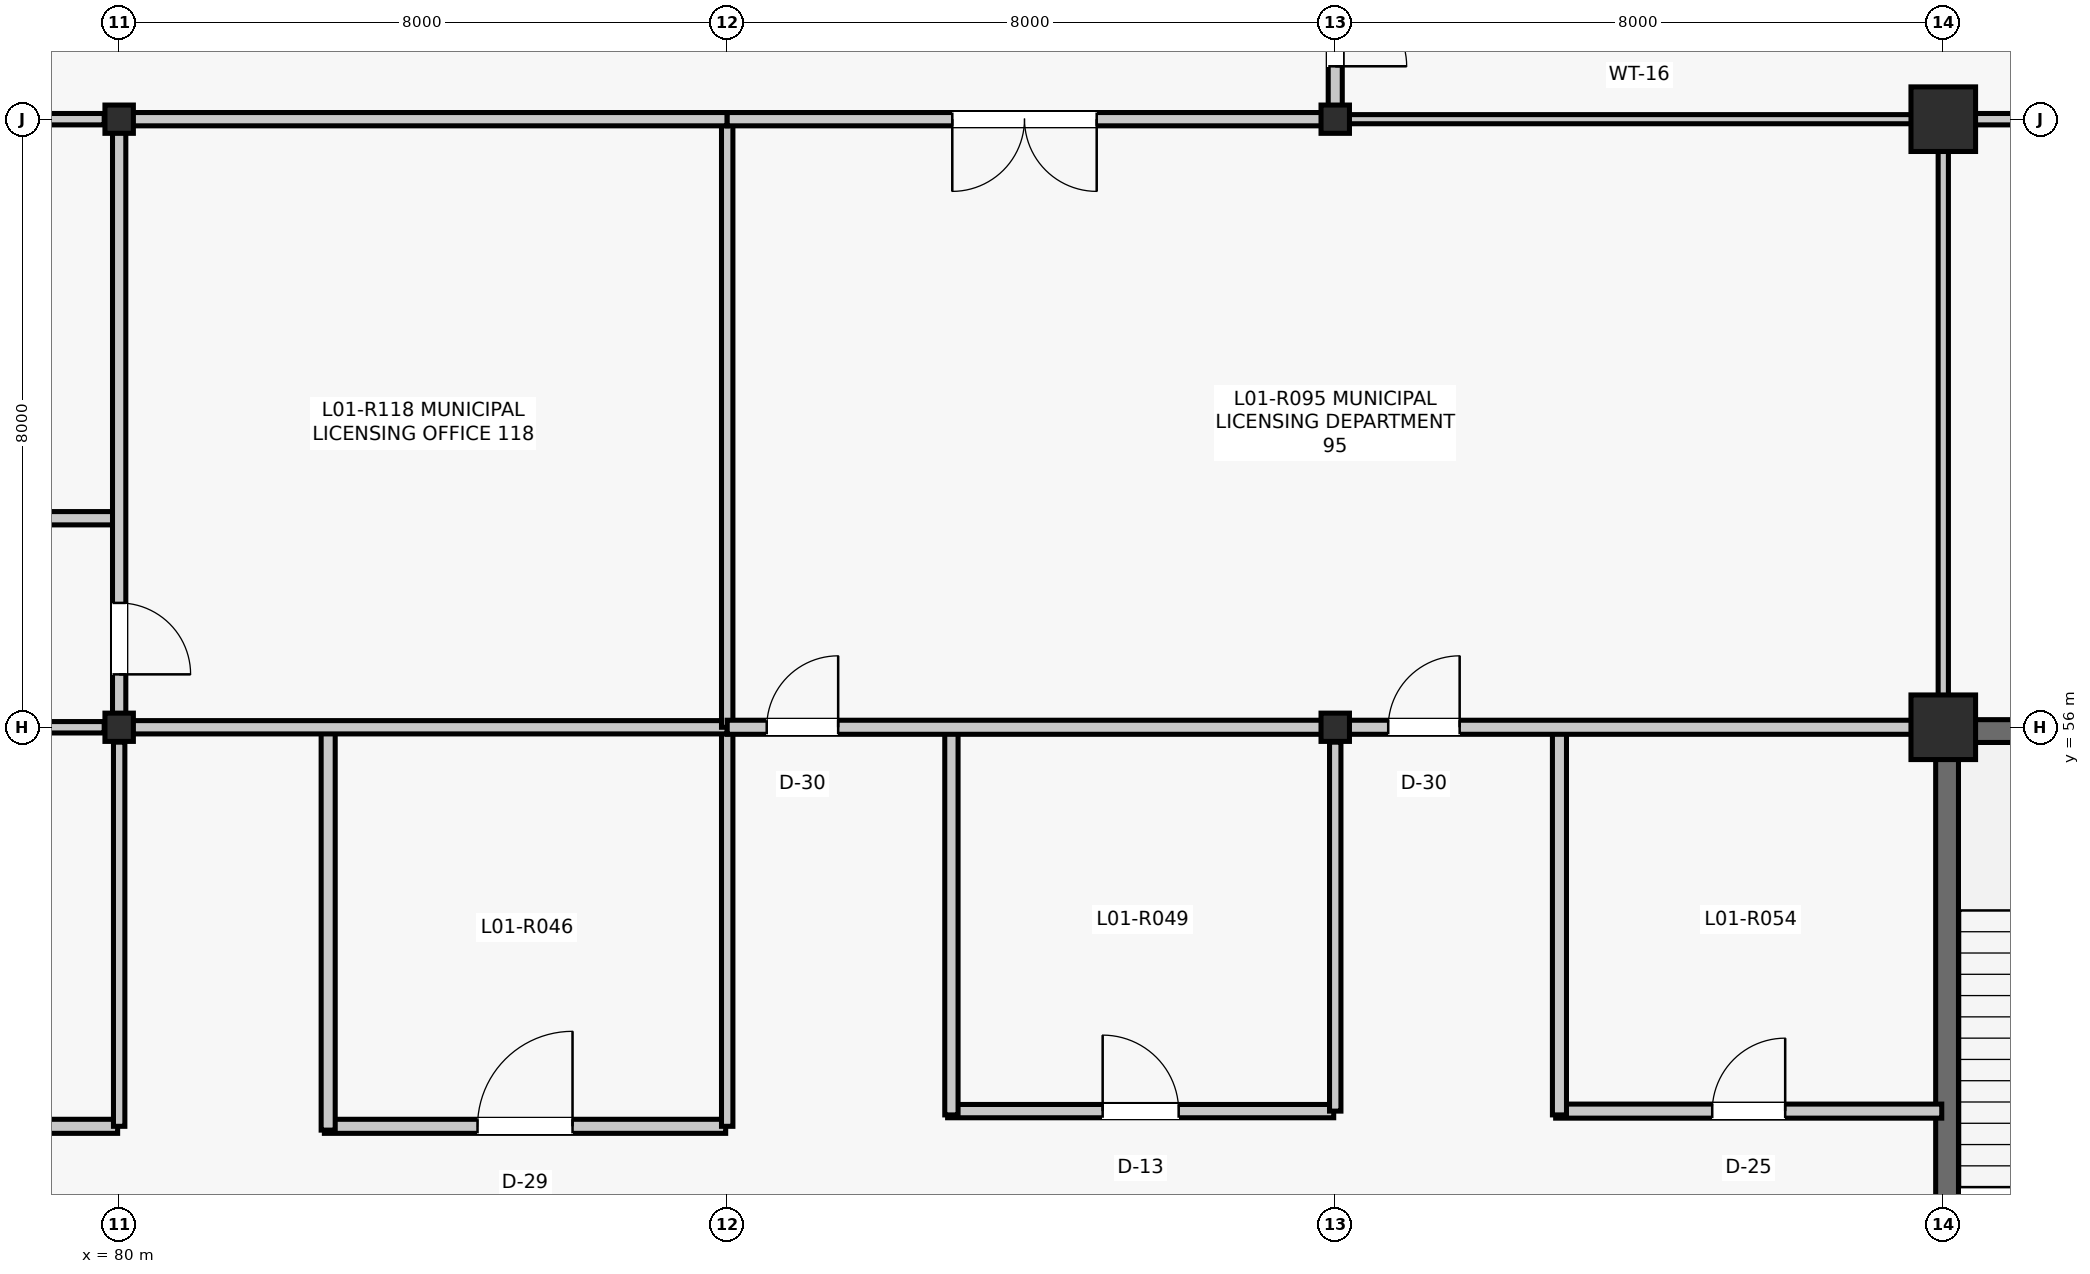
"""IFC4 building model, lengths in metres.
Left out: names, types, materials, properties, quantities, classifications, styles, units other than length and angle.
Written with IfcOpenShell. Run it as: python <this file> out.ifc"""

import sys

from ifc_helpers import new_model, si_unit, direction, frame, frame_2d, origin, origin_2d, place, context, subcontext, project, spatial, rectangle, i_section, extrude, element, fill, save


model = new_model("IFC4")
c1 = context("Model", 3, precision=1e-05, world=origin(), true_north=direction((0.0, 1.0)))
c2 = subcontext(c1, "Body", "Model", "MODEL_VIEW")
j1 = project(units=[si_unit("LENGTHUNIT", "METRE"), si_unit("PLANEANGLEUNIT", "RADIAN")], contexts=[c1])
p1 = place(None, origin())
s1 = spatial("IfcSite", under=j1, at=p1, CompositionType="ELEMENT")
p2 = place(p1, origin())
s2 = spatial("IfcBuilding", under=s1, at=p2, CompositionType="ELEMENT")
p3 = place(p2, frame((0.0, 0.0, 5.28)))
s3 = spatial("IfcBuildingStorey", under=s2, at=p3, CompositionType="ELEMENT", Elevation=5.28)
for number, where, z_axis, x_axis in (
    (1, (80.0, 56.0, 0.0), (0.0, 0.0, 1.0), (1.0, 0.0, 0.0)),
    (2, (80.0, 64.0, 0.0), (0.0, 0.0, 1.0), (1.0, 0.0, 0.0)),
    (3, (96.0, 56.0, 0.0), (0.0, 0.0, 1.0), (1.0, 0.0, 0.0)),
    (4, (96.0, 64.0, 0.0), (0.0, 0.0, 1.0), (1.0, 0.0, 0.0)),
):
    element("IfcColumn", number, at=place(p3, frame(where, z_axis=z_axis, x_axis=x_axis)), inside=s3, PredefinedType="COLUMN", context=c2, shape_type="SweptSolid", body=[
        extrude(i_section(OverallWidth=0.374, OverallDepth=0.372, WebThickness=0.016, FlangeThickness=0.026, FilletRadius=0.015, at=origin_2d()), origin(), (0.0, 0.0, 1.0), 4.62),
    ])
for number, where, z_axis, x_axis in (
    (5, (104.0, 56.0, 0.0), (0.0, 0.0, 1.0), (1.0, 0.0, 0.0)),
    (6, (104.0, 64.0, 0.0), (0.0, 0.0, 1.0), (1.0, 0.0, 0.0)),
):
    element("IfcColumn", number, at=place(p3, frame(where, z_axis=z_axis, x_axis=x_axis)), inside=s3, PredefinedType="COLUMN", context=c2, shape_type="SweptSolid", body=[
        extrude(rectangle(XDim=0.85, YDim=0.85, at=origin_2d()), origin(), (0.0, 0.0, 1.0), 4.62),
    ])
p4 = place(p3, frame((104.05, 48.315, 0.0), z_axis=(0.0, 0.0, 1.0), x_axis=(0.0, 1.0, 0.0)))
e7 = element("IfcWall", 7, at=p4, inside=s3, PredefinedType="SHEAR", context=c2, shape_type="SweptSolid", body=[
    extrude(rectangle(XDim=7.37, YDim=0.3, at=frame_2d((3.685, 0.0))), origin(), (0.0, 0.0, 1.0), 4.335),
])
p5 = place(p3, frame((104.315, 55.95, 0.0), z_axis=(0.0, 0.0, 1.0), x_axis=(1.0, 0.0, 0.0)))
e8 = element("IfcWall", 8, at=p5, inside=s3, PredefinedType="SHEAR", context=c2, shape_type="SweptSolid", body=[
    extrude(rectangle(XDim=7.395, YDim=0.3, at=frame_2d((3.698, 0.0))), origin(), (0.0, 0.0, 1.0), 4.335),
])
p6 = place(p3, frame((74.7, 50.75, 0.0), z_axis=(0.0, 0.0, 1.0), x_axis=(1.0, 0.0, 0.0)))
e9 = element("IfcWall", 9, at=p6, inside=s3, PredefinedType="PARTITIONING", context=c2, shape_type="SweptSolid", body=[
    extrude(rectangle(XDim=5.28, YDim=0.185, at=frame_2d((2.64, 0.0))), origin(), (0.0, 0.0, 1.0), 3.787),
])
p7 = place(p6, frame((2.1, 0.0, 0.0)))
e10 = element("IfcOpeningElement", 10, at=p7, cuts=e9, PredefinedType="OPENING", context=c2, shape_type="SweptSolid", body=[
    extrude(rectangle(XDim=1.08, YDim=2.2, at=frame_2d((0.54, 1.1))), frame((0.0, 0.103, 0.0), z_axis=(0.0, -1.0, 0.0), x_axis=(1.0, 0.0, 0.0)), (0.0, 0.0, 1.0), 0.205),
])
p8 = place(p3, frame((74.75, 56.0, 0.0), z_axis=(0.0, 0.0, 1.0), x_axis=(1.0, 0.0, 0.0)))
e11 = element("IfcWall", 11, at=p8, inside=s3, PredefinedType="PARTITIONING", context=c2, shape_type="SweptSolid", body=[
    extrude(rectangle(XDim=5.053, YDim=0.15, at=frame_2d((2.526, 0.0))), origin(), (0.0, 0.0, 1.0), 3.712),
])
p9 = place(p3, frame((80.0, 50.75, 0.0), z_axis=(0.0, 0.0, 1.0), x_axis=(0.0, 1.0, 0.0)))
e12 = element("IfcWall", 12, at=p9, inside=s3, PredefinedType="PARTITIONING", context=c2, shape_type="SweptSolid", body=[
    extrude(rectangle(XDim=5.054, YDim=0.15, at=frame_2d((2.527, 0.0))), origin(), (0.0, 0.0, 1.0), 3.787),
])
p10 = place(p3, frame((74.7, 58.75, 0.0), z_axis=(0.0, 0.0, 1.0), x_axis=(1.0, 0.0, 0.0)))
e13 = element("IfcWall", 13, at=p10, inside=s3, PredefinedType="PARTITIONING", context=c2, shape_type="SweptSolid", body=[
    extrude(rectangle(XDim=5.28, YDim=0.175, at=frame_2d((2.64, 0.0))), origin(), (0.0, 0.0, 1.0), 3.857),
])
p11 = place(p10, frame((2.12, 0.0, 0.0)))
e14 = element("IfcOpeningElement", 14, at=p11, cuts=e13, PredefinedType="OPENING", context=c2, shape_type="SweptSolid", body=[
    extrude(rectangle(XDim=1.04, YDim=2.18, at=frame_2d((0.52, 1.09))), frame((0.0, 0.097, 0.0), z_axis=(0.0, -1.0, 0.0), x_axis=(1.0, 0.0, 0.0)), (0.0, 0.0, 1.0), 0.195),
])
p12 = place(p3, frame((74.75, 64.0, 0.0), z_axis=(0.0, 0.0, 1.0), x_axis=(1.0, 0.0, 0.0)))
e15 = element("IfcWall", 15, at=p12, inside=s3, PredefinedType="PARTITIONING", context=c2, shape_type="SweptSolid", body=[
    extrude(rectangle(XDim=5.053, YDim=0.15, at=frame_2d((2.526, 0.0))), origin(), (0.0, 0.0, 1.0), 3.787),
])
p13 = place(p3, frame((82.7, 50.75, 0.0), z_axis=(0.0, 0.0, 1.0), x_axis=(1.0, 0.0, 0.0)))
e16 = element("IfcWall", 16, at=p13, inside=s3, PredefinedType="PARTITIONING", context=c2, shape_type="SweptSolid", body=[
    extrude(rectangle(XDim=5.28, YDim=0.185, at=frame_2d((2.64, 0.0))), origin(), (0.0, 0.0, 1.0), 4.325),
])
p14 = place(p13, frame((2.015, 0.0, 0.0)))
e17 = element("IfcOpeningElement", 17, at=p14, cuts=e16, PredefinedType="OPENING", context=c2, shape_type="SweptSolid", body=[
    extrude(rectangle(XDim=1.25, YDim=2.18, at=frame_2d((0.625, 1.09))), frame((0.0, 0.103, 0.0), z_axis=(0.0, -1.0, 0.0), x_axis=(1.0, 0.0, 0.0)), (0.0, 0.0, 1.0), 0.205),
])
p15 = place(p3, frame((82.75, 50.7, 0.0), z_axis=(0.0, 0.0, 1.0), x_axis=(0.0, 1.0, 0.0)))
e18 = element("IfcWall", 18, at=p15, inside=s3, PredefinedType="PARTITIONING", context=c2, shape_type="SweptSolid", body=[
    extrude(rectangle(XDim=5.28, YDim=0.185, at=frame_2d((2.64, 0.0))), origin(), (0.0, 0.0, 1.0), 3.55),
])
p16 = place(p3, frame((88.0, 50.75, 0.0), z_axis=(0.0, 0.0, 1.0), x_axis=(0.0, 1.0, 0.0)))
e19 = element("IfcWall", 19, at=p16, inside=s3, PredefinedType="PARTITIONING", context=c2, shape_type="SweptSolid", body=[
    extrude(rectangle(XDim=5.23, YDim=0.15, at=frame_2d((2.615, 0.0))), origin(), (0.0, 0.0, 1.0), 3.55),
])
p17 = place(p3, frame((90.9, 50.95, 0.0), z_axis=(0.0, 0.0, 1.0), x_axis=(1.0, 0.0, 0.0)))
e20 = element("IfcWall", 20, at=p17, inside=s3, PredefinedType="PARTITIONING", context=c2, shape_type="SweptSolid", body=[
    extrude(rectangle(XDim=5.08, YDim=0.175, at=frame_2d((2.54, 0.0))), origin(), (0.0, 0.0, 1.0), 3.781),
])
p18 = place(p17, frame((2.04, 0.0, 0.0)))
e21 = element("IfcOpeningElement", 21, at=p18, cuts=e20, PredefinedType="OPENING", context=c2, shape_type="SweptSolid", body=[
    extrude(rectangle(XDim=1.0, YDim=2.15, at=frame_2d((0.5, 1.075))), frame((0.0, 0.097, 0.0), z_axis=(0.0, -1.0, 0.0), x_axis=(1.0, 0.0, 0.0)), (0.0, 0.0, 1.0), 0.195),
])
p19 = place(p3, frame((90.95, 50.9, 0.0), z_axis=(0.0, 0.0, 1.0), x_axis=(0.0, 1.0, 0.0)))
e22 = element("IfcWall", 22, at=p19, inside=s3, PredefinedType="PARTITIONING", context=c2, shape_type="SweptSolid", body=[
    extrude(rectangle(XDim=5.08, YDim=0.175, at=frame_2d((2.54, 0.0))), origin(), (0.0, 0.0, 1.0), 3.55),
])
p20 = place(p3, frame((96.0, 50.95, 0.0), z_axis=(0.0, 0.0, 1.0), x_axis=(0.0, 1.0, 0.0)))
e23 = element("IfcWall", 23, at=p20, inside=s3, PredefinedType="PARTITIONING", context=c2, shape_type="SweptSolid", body=[
    extrude(rectangle(XDim=4.854, YDim=0.15, at=frame_2d((2.427, 0.0))), origin(), (0.0, 0.0, 1.0), 3.781),
])
p21 = place(p3, frame((98.9, 50.95, 0.0), z_axis=(0.0, 0.0, 1.0), x_axis=(1.0, 0.0, 0.0)))
e24 = element("IfcWall", 24, at=p21, inside=s3, PredefinedType="PARTITIONING", context=c2, shape_type="SweptSolid", body=[
    extrude(rectangle(XDim=5.08, YDim=0.185, at=frame_2d((2.54, 0.0))), origin(), (0.0, 0.0, 1.0), 3.851),
])
p22 = place(p21, frame((2.06, 0.0, 0.0)))
e25 = element("IfcOpeningElement", 25, at=p22, cuts=e24, PredefinedType="OPENING", context=c2, shape_type="SweptSolid", body=[
    extrude(rectangle(XDim=0.96, YDim=2.14, at=frame_2d((0.48, 1.07))), frame((0.0, 0.103, 0.0), z_axis=(0.0, -1.0, 0.0), x_axis=(1.0, 0.0, 0.0)), (0.0, 0.0, 1.0), 0.205),
])
p23 = place(p3, frame((98.95, 50.9, 0.0), z_axis=(0.0, 0.0, 1.0), x_axis=(0.0, 1.0, 0.0)))
e26 = element("IfcWall", 26, at=p23, inside=s3, PredefinedType="PARTITIONING", context=c2, shape_type="SweptSolid", body=[
    extrude(rectangle(XDim=5.08, YDim=0.185, at=frame_2d((2.54, 0.0))), origin(), (0.0, 0.0, 1.0), 3.781),
])
p24 = place(p3, frame((80.0, 56.176, 0.0), z_axis=(0.0, 0.0, 1.0), x_axis=(0.0, 1.0, 0.0)))
e27 = element("IfcWall", 27, at=p24, inside=s3, PredefinedType="PARTITIONING", context=c2, shape_type="SweptSolid", body=[
    extrude(rectangle(XDim=7.648, YDim=0.175, at=frame_2d((3.824, 0.0))), origin(), (0.0, 0.0, 1.0), 3.857),
])
p25 = place(p24, frame((0.52, 0.0, 0.0)))
e28 = element("IfcOpeningElement", 28, at=p25, cuts=e27, PredefinedType="OPENING", context=c2, shape_type="SweptSolid", body=[
    extrude(rectangle(XDim=0.94, YDim=2.12, at=frame_2d((0.47, 1.06))), frame((0.0, 0.097, 0.0), z_axis=(0.0, -1.0, 0.0), x_axis=(1.0, 0.0, 0.0)), (0.0, 0.0, 1.0), 0.195),
])
p26 = place(p3, frame((80.177, 56.0, 0.0), z_axis=(0.0, 0.0, 1.0), x_axis=(1.0, 0.0, 0.0)))
e29 = element("IfcWall", 29, at=p26, inside=s3, PredefinedType="PARTITIONING", context=c2, shape_type="SweptSolid", body=[
    extrude(rectangle(XDim=7.823, YDim=0.175, at=frame_2d((3.912, 0.0))), origin(), (0.0, 0.0, 1.0), 3.55),
])
p27 = place(p3, frame((88.0, 56.0, 0.0), z_axis=(0.0, 0.0, 1.0), x_axis=(0.0, 1.0, 0.0)))
e30 = element("IfcWall", 30, at=p27, inside=s3, PredefinedType="PARTITIONING", context=c2, shape_type="SweptSolid", body=[
    extrude(rectangle(XDim=8.0, YDim=0.15, at=frame_2d((4.0, 0.0))), origin(), (0.0, 0.0, 1.0), 3.55),
])
p28 = place(p3, frame((80.177, 64.0, 0.0), z_axis=(0.0, 0.0, 1.0), x_axis=(1.0, 0.0, 0.0)))
e31 = element("IfcWall", 31, at=p28, inside=s3, PredefinedType="PARTITIONING", context=c2, shape_type="SweptSolid", body=[
    extrude(rectangle(XDim=7.823, YDim=0.175, at=frame_2d((3.912, 0.0))), origin(), (0.0, 0.0, 1.0), 3.562),
])
p29 = place(p3, frame((88.0, 56.0, 0.0), z_axis=(0.0, 0.0, 1.0), x_axis=(1.0, 0.0, 0.0)))
e32 = element("IfcWall", 32, at=p29, inside=s3, PredefinedType="PARTITIONING", context=c2, shape_type="SweptSolid", body=[
    extrude(rectangle(XDim=7.823, YDim=0.185, at=frame_2d((3.912, 0.0))), origin(), (0.0, 0.0, 1.0), 3.55),
])
p30 = place(p29, frame((0.52, 0.0, 0.0)))
e33 = element("IfcOpeningElement", 33, at=p30, cuts=e32, PredefinedType="OPENING", context=c2, shape_type="SweptSolid", body=[
    extrude(rectangle(XDim=0.94, YDim=2.12, at=frame_2d((0.47, 1.06))), frame((0.0, 0.103, 0.0), z_axis=(0.0, -1.0, 0.0), x_axis=(1.0, 0.0, 0.0)), (0.0, 0.0, 1.0), 0.205),
])
p31 = place(p3, frame((88.0, 64.0, 0.0), z_axis=(0.0, 0.0, 1.0), x_axis=(1.0, 0.0, 0.0)))
e34 = element("IfcWall", 34, at=p31, inside=s3, PredefinedType="PARTITIONING", context=c2, shape_type="SweptSolid", body=[
    extrude(rectangle(XDim=7.823, YDim=0.175, at=frame_2d((3.912, 0.0))), origin(), (0.0, 0.0, 1.0), 3.562),
])
p32 = place(p31, frame((2.961, 0.0, 0.0)))
e35 = element("IfcOpeningElement", 35, at=p32, cuts=e34, PredefinedType="OPENING", context=c2, shape_type="SweptSolid", body=[
    extrude(rectangle(XDim=1.9, YDim=2.38, at=frame_2d((0.95, 1.19))), frame((0.0, 0.097, 0.0), z_axis=(0.0, -1.0, 0.0), x_axis=(1.0, 0.0, 0.0)), (0.0, 0.0, 1.0), 0.195),
])
p33 = place(p3, frame((96.0, 64.176, 0.0), z_axis=(0.0, 0.0, 1.0), x_axis=(0.0, 1.0, 0.0)))
e36 = element("IfcWall", 36, at=p33, inside=s3, PredefinedType="PARTITIONING", context=c2, shape_type="SweptSolid", body=[
    extrude(rectangle(XDim=7.648, YDim=0.185, at=frame_2d((3.824, 0.0))), origin(), (0.0, 0.0, 1.0), 3.787),
])
p34 = place(p33, frame((0.52, 0.0, 0.0)))
e37 = element("IfcOpeningElement", 37, at=p34, cuts=e36, PredefinedType="OPENING", context=c2, shape_type="SweptSolid", body=[
    extrude(rectangle(XDim=0.94, YDim=2.12, at=frame_2d((0.47, 1.06))), frame((0.0, 0.103, 0.0), z_axis=(0.0, -1.0, 0.0), x_axis=(1.0, 0.0, 0.0)), (0.0, 0.0, 1.0), 0.205),
])
p35 = place(p3, frame((96.177, 56.0, 0.0), z_axis=(0.0, 0.0, 1.0), x_axis=(1.0, 0.0, 0.0)))
e38 = element("IfcWall", 38, at=p35, inside=s3, PredefinedType="PARTITIONING", context=c2, shape_type="SweptSolid", body=[
    extrude(rectangle(XDim=7.408, YDim=0.185, at=frame_2d((3.704, 0.0))), origin(), (0.0, 0.0, 1.0), 3.781),
])
p36 = place(p35, frame((0.52, 0.0, 0.0)))
e39 = element("IfcOpeningElement", 39, at=p36, cuts=e38, PredefinedType="OPENING", context=c2, shape_type="SweptSolid", body=[
    extrude(rectangle(XDim=0.94, YDim=2.12, at=frame_2d((0.47, 1.06))), frame((0.0, 0.103, 0.0), z_axis=(0.0, -1.0, 0.0), x_axis=(1.0, 0.0, 0.0)), (0.0, 0.0, 1.0), 0.205),
])
p37 = place(p3, frame((104.0, 56.415, 0.0), z_axis=(0.0, 0.0, 1.0), x_axis=(0.0, 1.0, 0.0)))
e40 = element("IfcWall", 40, at=p37, inside=s3, PredefinedType="PARTITIONING", context=c2, shape_type="SweptSolid", body=[
    extrude(rectangle(XDim=7.17, YDim=0.135, at=frame_2d((3.585, 0.0))), origin(), (0.0, 0.0, 1.0), 3.787),
])
p38 = place(p3, frame((96.177, 64.0, 0.0), z_axis=(0.0, 0.0, 1.0), x_axis=(1.0, 0.0, 0.0)))
e41 = element("IfcWall", 41, at=p38, inside=s3, PredefinedType="PARTITIONING", context=c2, shape_type="SweptSolid", body=[
    extrude(rectangle(XDim=7.408, YDim=0.12, at=frame_2d((3.704, 0.0))), origin(), (0.0, 0.0, 1.0), 3.712),
])
p39 = place(p3, frame((104.415, 64.0, 0.0), z_axis=(0.0, 0.0, 1.0), x_axis=(1.0, 0.0, 0.0)))
e42 = element("IfcWall", 42, at=p39, inside=s3, PredefinedType="PARTITIONING", context=c2, shape_type="SweptSolid", body=[
    extrude(rectangle(XDim=7.295, YDim=0.15, at=frame_2d((3.647, 0.0))), origin(), (0.0, 0.0, 1.0), 3.787),
])
p40 = place(p14, origin())
e43 = element("IfcDoor", 43, at=p40, inside=s3, OperationType="SINGLE_SWING_RIGHT", PredefinedType="DOOR", context=c2, shape_type="SweptSolid", body=[
    extrude(rectangle(XDim=1.25, YDim=2.18, at=frame_2d((0.625, 1.09))), frame((0.0, 0.025, 0.0), z_axis=(0.0, -1.0, 0.0), x_axis=(1.0, 0.0, 0.0)), (0.0, 0.0, 1.0), 0.05),
])
fill(e17, e43)
p41 = place(p18, origin())
e44 = element("IfcDoor", 44, at=p41, inside=s3, OperationType="SINGLE_SWING_LEFT", PredefinedType="DOOR", context=c2, shape_type="SweptSolid", body=[
    extrude(rectangle(XDim=1.0, YDim=2.15, at=frame_2d((0.5, 1.075))), frame((0.0, 0.025, 0.0), z_axis=(0.0, -1.0, 0.0), x_axis=(1.0, 0.0, 0.0)), (0.0, 0.0, 1.0), 0.05),
])
fill(e21, e44)
p42 = place(p22, origin())
e45 = element("IfcDoor", 45, at=p42, inside=s3, OperationType="SINGLE_SWING_RIGHT", PredefinedType="DOOR", context=c2, shape_type="SweptSolid", body=[
    extrude(rectangle(XDim=0.96, YDim=2.14, at=frame_2d((0.48, 1.07))), frame((0.0, 0.025, 0.0), z_axis=(0.0, -1.0, 0.0), x_axis=(1.0, 0.0, 0.0)), (0.0, 0.0, 1.0), 0.05),
])
fill(e25, e45)
p43 = place(p25, frame((0.94, 0.0, 0.0), z_axis=(0.0, 0.0, 1.0), x_axis=(-1.0, 0.0, 0.0)))
e46 = element("IfcDoor", 46, at=p43, inside=s3, OperationType="SINGLE_SWING_LEFT", PredefinedType="DOOR", context=c2, shape_type="SweptSolid", body=[
    extrude(rectangle(XDim=0.94, YDim=2.12, at=frame_2d((0.47, 1.06))), frame((0.0, 0.025, 0.0), z_axis=(0.0, -1.0, 0.0), x_axis=(1.0, 0.0, 0.0)), (0.0, 0.0, 1.0), 0.05),
])
fill(e28, e46)
p44 = place(p30, origin())
e47 = element("IfcDoor", 47, at=p44, inside=s3, OperationType="SINGLE_SWING_RIGHT", PredefinedType="DOOR", context=c2, shape_type="SweptSolid", body=[
    extrude(rectangle(XDim=0.94, YDim=2.12, at=frame_2d((0.47, 1.06))), frame((0.0, 0.025, 0.0), z_axis=(0.0, -1.0, 0.0), x_axis=(1.0, 0.0, 0.0)), (0.0, 0.0, 1.0), 0.05),
])
fill(e33, e47)
p45 = place(p32, frame((1.9, 0.0, 0.0), z_axis=(0.0, 0.0, 1.0), x_axis=(-1.0, 0.0, 0.0)))
e48 = element("IfcDoor", 48, at=p45, inside=s3, OperationType="DOUBLE_DOOR_SINGLE_SWING", PredefinedType="DOOR", context=c2, shape_type="SweptSolid", body=[
    extrude(rectangle(XDim=1.9, YDim=2.38, at=frame_2d((0.95, 1.19))), frame((0.0, 0.025, 0.0), z_axis=(0.0, -1.0, 0.0), x_axis=(1.0, 0.0, 0.0)), (0.0, 0.0, 1.0), 0.05),
])
fill(e35, e48)
p46 = place(p34, frame((0.94, 0.0, 0.0), z_axis=(0.0, 0.0, 1.0), x_axis=(-1.0, 0.0, 0.0)))
e49 = element("IfcDoor", 49, at=p46, inside=s3, OperationType="SINGLE_SWING_LEFT", PredefinedType="DOOR", context=c2, shape_type="SweptSolid", body=[
    extrude(rectangle(XDim=0.94, YDim=2.12, at=frame_2d((0.47, 1.06))), frame((0.0, 0.025, 0.0), z_axis=(0.0, -1.0, 0.0), x_axis=(1.0, 0.0, 0.0)), (0.0, 0.0, 1.0), 0.05),
])
fill(e37, e49)
p47 = place(p36, origin())
e50 = element("IfcDoor", 50, at=p47, inside=s3, OperationType="SINGLE_SWING_RIGHT", PredefinedType="DOOR", context=c2, shape_type="SweptSolid", body=[
    extrude(rectangle(XDim=0.94, YDim=2.12, at=frame_2d((0.47, 1.06))), frame((0.0, 0.025, 0.0), z_axis=(0.0, -1.0, 0.0), x_axis=(1.0, 0.0, 0.0)), (0.0, 0.0, 1.0), 0.05),
])
fill(e39, e50)
save(model, sys.argv[1])
